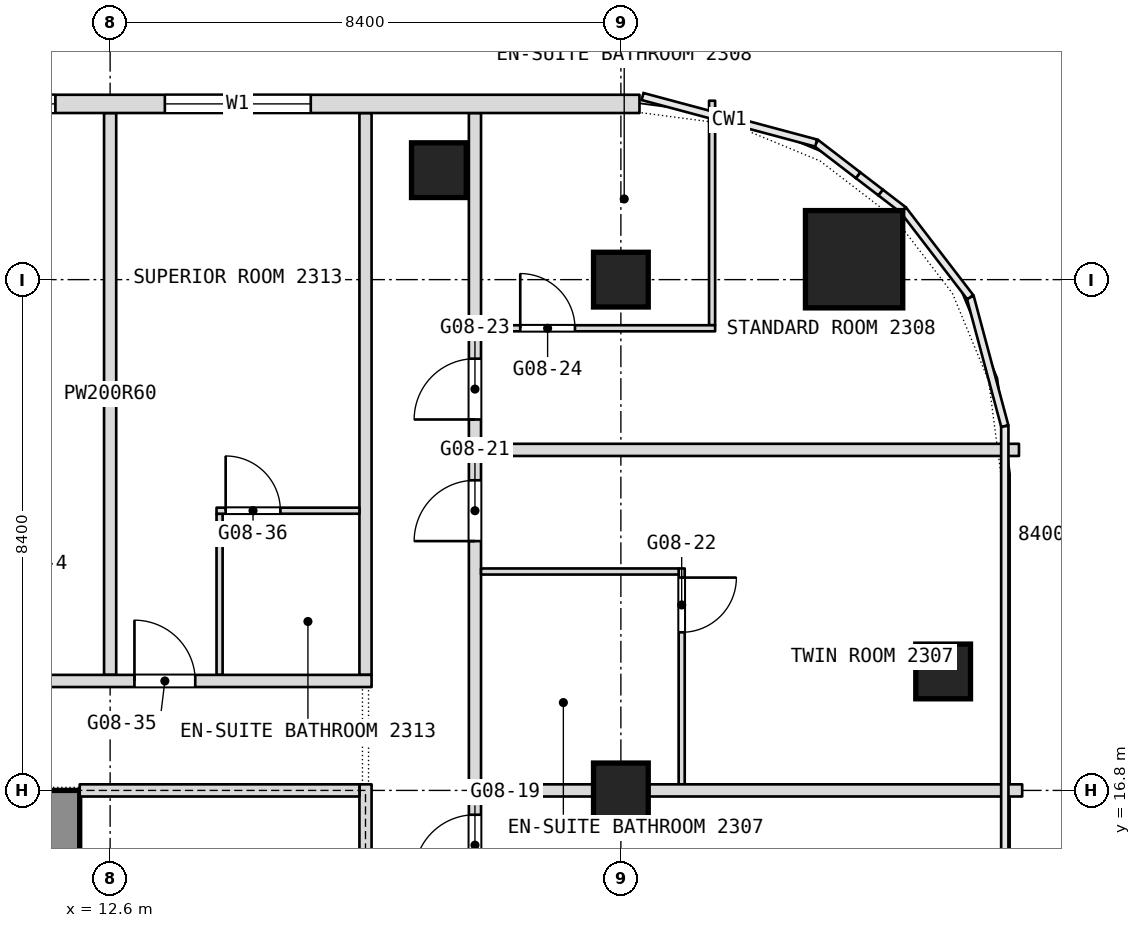
"""IFC4 building model, lengths in metres.
Left out: names, types, materials, properties, quantities, classifications, styles, units other than length and angle.
Written with IfcOpenShell. Run it as: python <this file> out.ifc"""

import sys

from ifc_helpers import new_model, si_unit, direction, frame, frame_2d, origin, origin_2d, place, context, subcontext, project, spatial, rectangle, extrude, element, fill, save


model = new_model("IFC4")
c1 = context("Model", 3, precision=1e-05, world=origin(), true_north=direction((0.0, 1.0)))
c2 = subcontext(c1, "Body", "Model", "MODEL_VIEW")
j1 = project(units=[si_unit("LENGTHUNIT", "METRE"), si_unit("PLANEANGLEUNIT", "RADIAN")], contexts=[c1])
p1 = place(None, origin())
s1 = spatial("IfcSite", under=j1, at=p1, CompositionType="ELEMENT")
p2 = place(p1, origin())
s2 = spatial("IfcBuilding", under=s1, at=p2, CompositionType="ELEMENT")
p3 = place(p2, frame((0.0, 0.0, 108.5)))
s3 = spatial("IfcBuildingStorey", under=s2, at=p3, CompositionType="ELEMENT", Elevation=108.5)
p4 = place(p3, frame((11.6, 0.0, 0.0), z_axis=(0.0, 0.0, 1.0), x_axis=(0.0, 1.0, 0.0)))
e1 = element("IfcWall", 1, at=p4, inside=s3, PredefinedType="SHEAR", context=c2, shape_type="SweptSolid", body=[
    extrude(rectangle(XDim=16.8, YDim=1.0, at=frame_2d((8.4, 0.0))), origin(), (0.0, 0.0, 1.0), 3.6),
])
p5 = place(p4, frame((2.3, 0.0, 0.0)))
e2 = element("IfcOpeningElement", 2, at=p5, cuts=e1, PredefinedType="OPENING", context=c2, shape_type="SweptSolid", body=[
    extrude(rectangle(XDim=1.1, YDim=2.1, at=frame_2d((0.55, 1.05))), frame((0.0, 0.5, 0.0), z_axis=(0.0, -1.0, 0.0), x_axis=(1.0, 0.0, 0.0)), (0.0, 0.0, 1.0), 1.0),
])
p6 = place(p4, frame((4.85, 0.0, 0.0)))
e3 = element("IfcOpeningElement", 3, at=p6, cuts=e1, PredefinedType="OPENING", context=c2, shape_type="SweptSolid", body=[
    extrude(rectangle(XDim=1.1, YDim=2.1, at=frame_2d((0.55, 1.05))), frame((0.0, 0.5, 0.0), z_axis=(0.0, -1.0, 0.0), x_axis=(1.0, 0.0, 0.0)), (0.0, 0.0, 1.0), 1.0),
])
p7 = place(p4, frame((6.825, 0.0, 0.0)))
e4 = element("IfcOpeningElement", 4, at=p7, cuts=e1, PredefinedType="OPENING", context=c2, shape_type="SweptSolid", body=[
    extrude(rectangle(XDim=1.2, YDim=2.1, at=frame_2d((0.6, 1.05))), frame((0.0, 0.5, 0.0), z_axis=(0.0, -1.0, 0.0), x_axis=(1.0, 0.0, 0.0)), (0.0, 0.0, 1.0), 1.0),
])
p8 = place(p4, frame((13.4, 0.0, 0.0)))
e5 = element("IfcOpeningElement", 5, at=p8, cuts=e1, PredefinedType="OPENING", context=c2, shape_type="SweptSolid", body=[
    extrude(rectangle(XDim=1.1, YDim=2.1, at=frame_2d((0.55, 1.05))), frame((0.0, 0.5, 0.0), z_axis=(0.0, -1.0, 0.0), x_axis=(1.0, 0.0, 0.0)), (0.0, 0.0, 1.0), 1.0),
])
p9 = place(p4, frame((10.85, 0.0, 0.0)))
e6 = element("IfcOpeningElement", 6, at=p9, cuts=e1, PredefinedType="OPENING", context=c2, shape_type="SweptSolid", body=[
    extrude(rectangle(XDim=1.1, YDim=2.1, at=frame_2d((0.55, 1.05))), frame((0.0, 0.5, 0.0), z_axis=(0.0, -1.0, 0.0), x_axis=(1.0, 0.0, 0.0)), (0.0, 0.0, 1.0), 1.0),
])
p10 = place(p4, frame((8.775, 0.0, 0.0)))
e7 = element("IfcOpeningElement", 7, at=p10, cuts=e1, PredefinedType="OPENING", context=c2, shape_type="SweptSolid", body=[
    extrude(rectangle(XDim=1.2, YDim=2.1, at=frame_2d((0.6, 1.05))), frame((0.0, 0.5, 0.0), z_axis=(0.0, -1.0, 0.0), x_axis=(1.0, 0.0, 0.0)), (0.0, 0.0, 1.0), 1.0),
])
p11 = place(p3, frame((24.835, 25.535, 0.0), z_axis=(0.0, 0.0, 1.0), x_axis=(1.0, 0.0, 0.0)))
e8 = element("IfcColumn", 8, at=p11, inside=s3, PredefinedType="COLUMN", context=c2, shape_type="SweptSolid", body=[
    extrude(rectangle(XDim=1.6, YDim=1.6, at=origin_2d()), origin(), (0.0, 0.0, 1.0), 3.6),
])
for number, where, z_axis, x_axis in (
    (9, (21.0, 16.8, 0.0), (0.0, 0.0, 1.0), (1.0, 0.0, 0.0)),
    (10, (21.0, 25.2, 0.0), (0.0, 0.0, 1.0), (1.0, 0.0, 0.0)),
    (11, (18.007, 27.0, 0.0), (0.0, 0.0, 1.0), (1.0, 0.0, 0.0)),
    (12, (26.3, 18.756, 0.0), (0.0, 0.0, 1.0), (1.0, 0.0, 0.0)),
):
    element("IfcColumn", number, at=place(p3, frame(where, z_axis=z_axis, x_axis=x_axis)), inside=s3, PredefinedType="COLUMN", context=c2, shape_type="SweptSolid", body=[
        extrude(rectangle(XDim=0.9, YDim=0.9, at=origin_2d()), origin(), (0.0, 0.0, 1.0), 3.6),
    ])
p12 = place(p3, frame((22.5, 24.45, 0.0), z_axis=(0.0, 0.0, 1.0), x_axis=(0.0, 1.0, 0.0)))
e13 = element("IfcWall", 13, at=p12, inside=s3, PredefinedType="PARTITIONING", context=c2, shape_type="SweptSolid", body=[
    extrude(rectangle(XDim=3.692, YDim=0.1, at=frame_2d((1.846, 0.0))), origin(), (0.0, 0.0, 1.0), 3.34),
])
p13 = place(p3, frame((22.0, 16.9, 0.0), z_axis=(0.0, 0.0, 1.0), x_axis=(0.0, 1.0, 0.0)))
e14 = element("IfcWall", 14, at=p13, inside=s3, PredefinedType="PARTITIONING", context=c2, shape_type="SweptSolid", body=[
    extrude(rectangle(XDim=3.55, YDim=0.1, at=frame_2d((1.775, 0.0))), origin(), (0.0, 0.0, 1.0), 3.34),
])
p14 = place(p13, frame((2.5, 0.0, 0.0)))
e15 = element("IfcOpeningElement", 15, at=p14, cuts=e14, PredefinedType="OPENING", context=c2, shape_type="SweptSolid", body=[
    extrude(rectangle(XDim=0.9, YDim=2.1, at=frame_2d((0.45, 1.05))), frame((0.0, 0.05, 0.0), z_axis=(0.0, -1.0, 0.0), x_axis=(1.0, 0.0, 0.0)), (0.0, 0.0, 1.0), 0.1),
])
p15 = place(p3, frame((18.6, -21.708, 0.0), z_axis=(0.0, 0.0, 1.0), x_axis=(0.0, 1.0, 0.0)))
e16 = element("IfcWall", 16, at=p15, inside=s3, PredefinedType="PARTITIONING", context=c2, shape_type="SweptSolid", body=[
    extrude(rectangle(XDim=49.648, YDim=0.2, at=frame_2d((24.824, 0.0))), origin(), (0.0, 0.0, 1.0), 3.34),
])
p16 = place(p15, frame((2.204, 0.0, 0.0)))
e17 = element("IfcOpeningElement", 17, at=p16, cuts=e16, PredefinedType="OPENING", context=c2, shape_type="SweptSolid", body=[
    extrude(rectangle(XDim=1.0, YDim=2.1, at=frame_2d((0.5, 1.05))), frame((0.0, 0.1, 0.0), z_axis=(0.0, -1.0, 0.0), x_axis=(1.0, 0.0, 0.0)), (0.0, 0.0, 1.0), 0.2),
])
p17 = place(p15, frame((7.708, 0.0, 0.0)))
e18 = element("IfcOpeningElement", 18, at=p17, cuts=e16, PredefinedType="OPENING", context=c2, shape_type="SweptSolid", body=[
    extrude(rectangle(XDim=1.0, YDim=2.1, at=frame_2d((0.5, 1.05))), frame((0.0, 0.1, 0.0), z_axis=(0.0, -1.0, 0.0), x_axis=(1.0, 0.0, 0.0)), (0.0, 0.0, 1.0), 0.2),
])
p18 = place(p15, frame((9.508, 0.0, 0.0)))
e19 = element("IfcOpeningElement", 19, at=p18, cuts=e16, PredefinedType="OPENING", context=c2, shape_type="SweptSolid", body=[
    extrude(rectangle(XDim=1.0, YDim=2.1, at=frame_2d((0.5, 1.05))), frame((0.0, 0.1, 0.0), z_axis=(0.0, -1.0, 0.0), x_axis=(1.0, 0.0, 0.0)), (0.0, 0.0, 1.0), 0.2),
])
p19 = place(p15, frame((13.708, 0.0, 0.0)))
e20 = element("IfcOpeningElement", 20, at=p19, cuts=e16, PredefinedType="OPENING", context=c2, shape_type="SweptSolid", body=[
    extrude(rectangle(XDim=1.0, YDim=2.1, at=frame_2d((0.5, 1.05))), frame((0.0, 0.1, 0.0), z_axis=(0.0, -1.0, 0.0), x_axis=(1.0, 0.0, 0.0)), (0.0, 0.0, 1.0), 0.2),
])
p20 = place(p15, frame((20.308, 0.0, 0.0)))
e21 = element("IfcOpeningElement", 21, at=p20, cuts=e16, PredefinedType="OPENING", context=c2, shape_type="SweptSolid", body=[
    extrude(rectangle(XDim=1.0, YDim=2.1, at=frame_2d((0.5, 1.05))), frame((0.0, 0.1, 0.0), z_axis=(0.0, -1.0, 0.0), x_axis=(1.0, 0.0, 0.0)), (0.0, 0.0, 1.0), 0.2),
])
p21 = place(p15, frame((25.008, 0.0, 0.0)))
e22 = element("IfcOpeningElement", 22, at=p21, cuts=e16, PredefinedType="OPENING", context=c2, shape_type="SweptSolid", body=[
    extrude(rectangle(XDim=1.8, YDim=2.1, at=frame_2d((0.9, 1.05))), frame((0.0, 0.1, 0.0), z_axis=(0.0, -1.0, 0.0), x_axis=(1.0, 0.0, 0.0)), (0.0, 0.0, 1.0), 0.2),
])
p22 = place(p15, frame((30.508, 0.0, 0.0)))
e23 = element("IfcOpeningElement", 23, at=p22, cuts=e16, PredefinedType="OPENING", context=c2, shape_type="SweptSolid", body=[
    extrude(rectangle(XDim=1.0, YDim=2.1, at=frame_2d((0.5, 1.05))), frame((0.0, 0.1, 0.0), z_axis=(0.0, -1.0, 0.0), x_axis=(1.0, 0.0, 0.0)), (0.0, 0.0, 1.0), 0.2),
])
p23 = place(p15, frame((37.108, 0.0, 0.0)))
e24 = element("IfcOpeningElement", 24, at=p23, cuts=e16, PredefinedType="OPENING", context=c2, shape_type="SweptSolid", body=[
    extrude(rectangle(XDim=1.0, YDim=2.1, at=frame_2d((0.5, 1.05))), frame((0.0, 0.1, 0.0), z_axis=(0.0, -1.0, 0.0), x_axis=(1.0, 0.0, 0.0)), (0.0, 0.0, 1.0), 0.2),
])
p24 = place(p15, frame((42.608, 0.0, 0.0)))
e25 = element("IfcOpeningElement", 25, at=p24, cuts=e16, PredefinedType="OPENING", context=c2, shape_type="SweptSolid", body=[
    extrude(rectangle(XDim=1.0, YDim=2.1, at=frame_2d((0.5, 1.05))), frame((0.0, 0.1, 0.0), z_axis=(0.0, -1.0, 0.0), x_axis=(1.0, 0.0, 0.0)), (0.0, 0.0, 1.0), 0.2),
])
p25 = place(p15, frame((44.608, 0.0, 0.0)))
e26 = element("IfcOpeningElement", 26, at=p25, cuts=e16, PredefinedType="OPENING", context=c2, shape_type="SweptSolid", body=[
    extrude(rectangle(XDim=1.0, YDim=2.1, at=frame_2d((0.5, 1.05))), frame((0.0, 0.1, 0.0), z_axis=(0.0, -1.0, 0.0), x_axis=(1.0, 0.0, 0.0)), (0.0, 0.0, 1.0), 0.2),
])
p26 = place(p3, frame((16.8, 18.7, 0.0), z_axis=(0.0, 0.0, 1.0), x_axis=(0.0, 1.0, 0.0)))
e27 = element("IfcWall", 27, at=p26, inside=s3, PredefinedType="PARTITIONING", context=c2, shape_type="SweptSolid", body=[
    extrude(rectangle(XDim=9.24, YDim=0.2, at=frame_2d((4.62, 0.0))), origin(), (0.0, 0.0, 1.0), 3.34),
])
p27 = place(p3, frame((14.4, 18.7, 0.0), z_axis=(0.0, 0.0, 1.0), x_axis=(0.0, 1.0, 0.0)))
e28 = element("IfcWall", 28, at=p27, inside=s3, PredefinedType="PARTITIONING", context=c2, shape_type="SweptSolid", body=[
    extrude(rectangle(XDim=2.65, YDim=0.1, at=frame_2d((1.325, 0.0))), origin(), (0.0, 0.0, 1.0), 3.34),
])
p28 = place(p3, frame((12.6, 18.7, 0.0), z_axis=(0.0, 0.0, 1.0), x_axis=(0.0, 1.0, 0.0)))
e29 = element("IfcWall", 29, at=p28, inside=s3, PredefinedType="PARTITIONING", context=c2, shape_type="SweptSolid", body=[
    extrude(rectangle(XDim=9.24, YDim=0.2, at=frame_2d((4.62, 0.0))), origin(), (0.0, 0.0, 1.0), 3.34),
])
p29 = place(p3, frame((18.7, 16.8, 0.0), z_axis=(0.0, 0.0, 1.0), x_axis=(1.0, 0.0, 0.0)))
e30 = element("IfcWall", 30, at=p29, inside=s3, PredefinedType="PARTITIONING", context=c2, shape_type="SweptSolid", body=[
    extrude(rectangle(XDim=8.9, YDim=0.2, at=frame_2d((4.45, 0.0))), origin(), (0.0, 0.0, 1.0), 2.89),
])
p30 = place(p3, frame((10.7, 18.6, 0.0), z_axis=(0.0, 0.0, 1.0), x_axis=(1.0, 0.0, 0.0)))
e31 = element("IfcWall", 31, at=p30, inside=s3, PredefinedType="PARTITIONING", context=c2, shape_type="SweptSolid", body=[
    extrude(rectangle(XDim=6.2, YDim=0.2, at=frame_2d((3.1, 0.0))), origin(), (0.0, 0.0, 1.0), 3.34),
])
p31 = place(p30, frame((2.3, 0.0, 0.0)))
e32 = element("IfcOpeningElement", 32, at=p31, cuts=e31, PredefinedType="OPENING", context=c2, shape_type="SweptSolid", body=[
    extrude(rectangle(XDim=1.0, YDim=2.1, at=frame_2d((0.5, 1.05))), frame((0.0, 0.1, 0.0), z_axis=(0.0, -1.0, 0.0), x_axis=(1.0, 0.0, 0.0)), (0.0, 0.0, 1.0), 0.2),
])
p32 = place(p3, frame((18.7, 20.4, 0.0), z_axis=(0.0, 0.0, 1.0), x_axis=(1.0, 0.0, 0.0)))
e33 = element("IfcWall", 33, at=p32, inside=s3, PredefinedType="PARTITIONING", context=c2, shape_type="SweptSolid", body=[
    extrude(rectangle(XDim=3.25, YDim=0.1, at=frame_2d((1.625, 0.0))), origin(), (0.0, 0.0, 1.0), 3.34),
])
p33 = place(p3, frame((14.35, 21.4, 0.0), z_axis=(0.0, 0.0, 1.0), x_axis=(1.0, 0.0, 0.0)))
e34 = element("IfcWall", 34, at=p33, inside=s3, PredefinedType="PARTITIONING", context=c2, shape_type="SweptSolid", body=[
    extrude(rectangle(XDim=2.35, YDim=0.1, at=frame_2d((1.175, 0.0))), origin(), (0.0, 0.0, 1.0), 3.34),
])
p34 = place(p33, frame((0.15, 0.0, 0.0)))
e35 = element("IfcOpeningElement", 35, at=p34, cuts=e34, PredefinedType="OPENING", context=c2, shape_type="SweptSolid", body=[
    extrude(rectangle(XDim=0.9, YDim=2.1, at=frame_2d((0.45, 1.05))), frame((0.0, 0.05, 0.0), z_axis=(0.0, -1.0, 0.0), x_axis=(1.0, 0.0, 0.0)), (0.0, 0.0, 1.0), 0.1),
])
p35 = place(p3, frame((18.7, 22.4, 0.0), z_axis=(0.0, 0.0, 1.0), x_axis=(1.0, 0.0, 0.0)))
e36 = element("IfcWall", 36, at=p35, inside=s3, PredefinedType="PARTITIONING", context=c2, shape_type="SweptSolid", body=[
    extrude(rectangle(XDim=8.847, YDim=0.2, at=frame_2d((4.424, 0.0))), origin(), (0.0, 0.0, 1.0), 3.34),
])
p36 = place(p3, frame((18.7, 24.4, 0.0), z_axis=(0.0, 0.0, 1.0), x_axis=(1.0, 0.0, 0.0)))
e37 = element("IfcWall", 37, at=p36, inside=s3, PredefinedType="PARTITIONING", context=c2, shape_type="SweptSolid", body=[
    extrude(rectangle(XDim=3.85, YDim=0.1, at=frame_2d((1.925, 0.0))), origin(), (0.0, 0.0, 1.0), 3.34),
])
p37 = place(p36, frame((0.645, 0.0, 0.0)))
e38 = element("IfcOpeningElement", 38, at=p37, cuts=e37, PredefinedType="OPENING", context=c2, shape_type="SweptSolid", body=[
    extrude(rectangle(XDim=0.9, YDim=2.1, at=frame_2d((0.45, 1.05))), frame((0.0, 0.05, 0.0), z_axis=(0.0, -1.0, 0.0), x_axis=(1.0, 0.0, 0.0)), (0.0, 0.0, 1.0), 0.1),
])
p38 = place(p3, frame((21.306, 28.09, 0.0), z_axis=(0.0, 0.0, 1.0), x_axis=(-1.0, 0.0, 0.0)))
e39 = element("IfcWall", 39, at=p38, inside=s3, PredefinedType="NOTDEFINED", context=c2, shape_type="SweptSolid", body=[
    extrude(rectangle(XDim=42.612, YDim=0.3, at=frame_2d((21.306, 0.0))), origin(), (0.0, 0.0, 1.0), 3.6),
])
p39 = place(p38, frame((5.406, 0.0, 0.9)))
e40 = element("IfcOpeningElement", 40, at=p39, cuts=e39, PredefinedType="OPENING", context=c2, shape_type="SweptSolid", body=[
    extrude(rectangle(XDim=2.4, YDim=2.1, at=frame_2d((1.2, 1.05))), frame((0.0, 0.15, 0.0), z_axis=(0.0, -1.0, 0.0), x_axis=(1.0, 0.0, 0.0)), (0.0, 0.0, 1.0), 0.3),
])
p40 = place(p38, frame((9.606, 0.0, 0.9)))
e41 = element("IfcOpeningElement", 41, at=p40, cuts=e39, PredefinedType="OPENING", context=c2, shape_type="SweptSolid", body=[
    extrude(rectangle(XDim=2.4, YDim=2.1, at=frame_2d((1.2, 1.05))), frame((0.0, 0.15, 0.0), z_axis=(0.0, -1.0, 0.0), x_axis=(1.0, 0.0, 0.0)), (0.0, 0.0, 1.0), 0.3),
])
p41 = place(p38, frame((13.806, 0.0, 0.9)))
e42 = element("IfcOpeningElement", 42, at=p41, cuts=e39, PredefinedType="OPENING", context=c2, shape_type="SweptSolid", body=[
    extrude(rectangle(XDim=2.4, YDim=2.1, at=frame_2d((1.2, 1.05))), frame((0.0, 0.15, 0.0), z_axis=(0.0, -1.0, 0.0), x_axis=(1.0, 0.0, 0.0)), (0.0, 0.0, 1.0), 0.3),
])
p42 = place(p38, frame((18.006, 0.0, 0.9)))
e43 = element("IfcOpeningElement", 43, at=p42, cuts=e39, PredefinedType="OPENING", context=c2, shape_type="SweptSolid", body=[
    extrude(rectangle(XDim=2.4, YDim=2.1, at=frame_2d((1.2, 1.05))), frame((0.0, 0.15, 0.0), z_axis=(0.0, -1.0, 0.0), x_axis=(1.0, 0.0, 0.0)), (0.0, 0.0, 1.0), 0.3),
])
p43 = place(p38, frame((22.206, 0.0, 0.9)))
e44 = element("IfcOpeningElement", 44, at=p43, cuts=e39, PredefinedType="OPENING", context=c2, shape_type="SweptSolid", body=[
    extrude(rectangle(XDim=2.4, YDim=2.1, at=frame_2d((1.2, 1.05))), frame((0.0, 0.15, 0.0), z_axis=(0.0, -1.0, 0.0), x_axis=(1.0, 0.0, 0.0)), (0.0, 0.0, 1.0), 0.3),
])
p44 = place(p38, frame((26.406, 0.0, 0.9)))
e45 = element("IfcOpeningElement", 45, at=p44, cuts=e39, PredefinedType="OPENING", context=c2, shape_type="SweptSolid", body=[
    extrude(rectangle(XDim=2.4, YDim=2.1, at=frame_2d((1.2, 1.05))), frame((0.0, 0.15, 0.0), z_axis=(0.0, -1.0, 0.0), x_axis=(1.0, 0.0, 0.0)), (0.0, 0.0, 1.0), 0.3),
])
p45 = place(p38, frame((30.606, 0.0, 0.9)))
e46 = element("IfcOpeningElement", 46, at=p45, cuts=e39, PredefinedType="OPENING", context=c2, shape_type="SweptSolid", body=[
    extrude(rectangle(XDim=2.4, YDim=2.1, at=frame_2d((1.2, 1.05))), frame((0.0, 0.15, 0.0), z_axis=(0.0, -1.0, 0.0), x_axis=(1.0, 0.0, 0.0)), (0.0, 0.0, 1.0), 0.3),
])
p46 = place(p38, frame((34.806, 0.0, 0.9)))
e47 = element("IfcOpeningElement", 47, at=p46, cuts=e39, PredefinedType="OPENING", context=c2, shape_type="SweptSolid", body=[
    extrude(rectangle(XDim=2.4, YDim=2.1, at=frame_2d((1.2, 1.05))), frame((0.0, 0.15, 0.0), z_axis=(0.0, -1.0, 0.0), x_axis=(1.0, 0.0, 0.0)), (0.0, 0.0, 1.0), 0.3),
])
p47 = place(p3, frame((16.8, -0.1, 0.0), z_axis=(0.0, 0.0, 1.0), x_axis=(0.0, 1.0, 0.0)))
e48 = element("IfcWall", 48, at=p47, inside=s3, PredefinedType="PARTITIONING", context=c2, shape_type="SweptSolid", body=[
    extrude(rectangle(XDim=17.0, YDim=0.2, at=frame_2d((8.5, 0.0))), origin(), (0.0, 0.0, 1.0), 3.34),
])
p48 = place(p47, frame((2.2, 0.0, 0.0)))
e49 = element("IfcOpeningElement", 49, at=p48, cuts=e48, PredefinedType="OPENING", context=c2, shape_type="SweptSolid", body=[
    extrude(rectangle(XDim=1.8, YDim=2.1, at=frame_2d((0.9, 1.05))), frame((0.0, 0.1, 0.0), z_axis=(0.0, -1.0, 0.0), x_axis=(1.0, 0.0, 0.0)), (0.0, 0.0, 1.0), 0.2),
])
p49 = place(p47, frame((13.0, 0.0, 0.0)))
e50 = element("IfcOpeningElement", 50, at=p49, cuts=e48, PredefinedType="OPENING", context=c2, shape_type="SweptSolid", body=[
    extrude(rectangle(XDim=1.8, YDim=2.1, at=frame_2d((0.9, 1.05))), frame((0.0, 0.1, 0.0), z_axis=(0.0, -1.0, 0.0), x_axis=(1.0, 0.0, 0.0)), (0.0, 0.0, 1.0), 0.2),
])
p50 = place(p3, frame((12.1, 16.8, 0.0), z_axis=(0.0, 0.0, 1.0), x_axis=(1.0, 0.0, 0.0)))
e51 = element("IfcWall", 51, at=p50, inside=s3, PredefinedType="PARTITIONING", context=c2, shape_type="SweptSolid", body=[
    extrude(rectangle(XDim=4.6, YDim=0.2, at=frame_2d((2.3, 0.0))), origin(), (0.0, 0.0, 1.0), 2.89),
])
p51 = place(p14, origin())
e52 = element("IfcDoor", 52, at=p51, inside=s3, OperationType="SINGLE_SWING_RIGHT", PredefinedType="DOOR", context=c2, shape_type="SweptSolid", body=[
    extrude(rectangle(XDim=0.9, YDim=2.1, at=frame_2d((0.45, 1.05))), frame((0.0, 0.025, 0.0), z_axis=(0.0, -1.0, 0.0), x_axis=(1.0, 0.0, 0.0)), (0.0, 0.0, 1.0), 0.05),
])
fill(e15, e52)
p52 = place(p23, origin())
e53 = element("IfcDoor", 53, at=p52, inside=s3, OperationType="SINGLE_SWING_LEFT", PredefinedType="DOOR", context=c2, shape_type="SweptSolid", body=[
    extrude(rectangle(XDim=1.0, YDim=2.1, at=frame_2d((0.5, 1.05))), frame((0.0, 0.025, 0.0), z_axis=(0.0, -1.0, 0.0), x_axis=(1.0, 0.0, 0.0)), (0.0, 0.0, 1.0), 0.05),
])
fill(e24, e53)
p53 = place(p24, origin())
e54 = element("IfcDoor", 54, at=p53, inside=s3, OperationType="SINGLE_SWING_LEFT", PredefinedType="DOOR", context=c2, shape_type="SweptSolid", body=[
    extrude(rectangle(XDim=1.0, YDim=2.1, at=frame_2d((0.5, 1.05))), frame((0.0, 0.025, 0.0), z_axis=(0.0, -1.0, 0.0), x_axis=(1.0, 0.0, 0.0)), (0.0, 0.0, 1.0), 0.05),
])
fill(e25, e54)
p54 = place(p25, origin())
e55 = element("IfcDoor", 55, at=p54, inside=s3, OperationType="SINGLE_SWING_LEFT", PredefinedType="DOOR", context=c2, shape_type="SweptSolid", body=[
    extrude(rectangle(XDim=1.0, YDim=2.1, at=frame_2d((0.5, 1.05))), frame((0.0, 0.025, 0.0), z_axis=(0.0, -1.0, 0.0), x_axis=(1.0, 0.0, 0.0)), (0.0, 0.0, 1.0), 0.05),
])
fill(e26, e55)
p55 = place(p31, origin())
e56 = element("IfcDoor", 56, at=p55, inside=s3, OperationType="SINGLE_SWING_RIGHT", PredefinedType="DOOR", context=c2, shape_type="SweptSolid", body=[
    extrude(rectangle(XDim=1.0, YDim=2.1, at=frame_2d((0.5, 1.05))), frame((0.0, 0.025, 0.0), z_axis=(0.0, -1.0, 0.0), x_axis=(1.0, 0.0, 0.0)), (0.0, 0.0, 1.0), 0.05),
])
fill(e32, e56)
p56 = place(p34, origin())
e57 = element("IfcDoor", 57, at=p56, inside=s3, OperationType="SINGLE_SWING_RIGHT", PredefinedType="DOOR", context=c2, shape_type="SweptSolid", body=[
    extrude(rectangle(XDim=0.9, YDim=2.1, at=frame_2d((0.45, 1.05))), frame((0.0, 0.025, 0.0), z_axis=(0.0, -1.0, 0.0), x_axis=(1.0, 0.0, 0.0)), (0.0, 0.0, 1.0), 0.05),
])
fill(e35, e57)
p57 = place(p37, origin())
e58 = element("IfcDoor", 58, at=p57, inside=s3, OperationType="SINGLE_SWING_RIGHT", PredefinedType="DOOR", context=c2, shape_type="SweptSolid", body=[
    extrude(rectangle(XDim=0.9, YDim=2.1, at=frame_2d((0.45, 1.05))), frame((0.0, 0.025, 0.0), z_axis=(0.0, -1.0, 0.0), x_axis=(1.0, 0.0, 0.0)), (0.0, 0.0, 1.0), 0.05),
])
fill(e38, e58)
p58 = place(p39, origin())
e59 = element("IfcWindow", 59, at=p58, inside=s3, PartitioningType="SINGLE_PANEL", PredefinedType="WINDOW", context=c2, shape_type="SweptSolid", body=[
    extrude(rectangle(XDim=2.4, YDim=2.1, at=frame_2d((1.2, 1.05))), frame((0.0, 0.03, 0.0), z_axis=(0.0, -1.0, 0.0), x_axis=(1.0, 0.0, 0.0)), (0.0, 0.0, 1.0), 0.06),
])
fill(e40, e59)
p59 = place(p40, origin())
e60 = element("IfcWindow", 60, at=p59, inside=s3, PartitioningType="SINGLE_PANEL", PredefinedType="WINDOW", context=c2, shape_type="SweptSolid", body=[
    extrude(rectangle(XDim=2.4, YDim=2.1, at=frame_2d((1.2, 1.05))), frame((0.0, 0.03, 0.0), z_axis=(0.0, -1.0, 0.0), x_axis=(1.0, 0.0, 0.0)), (0.0, 0.0, 1.0), 0.06),
])
fill(e41, e60)
save(model, sys.argv[1])
